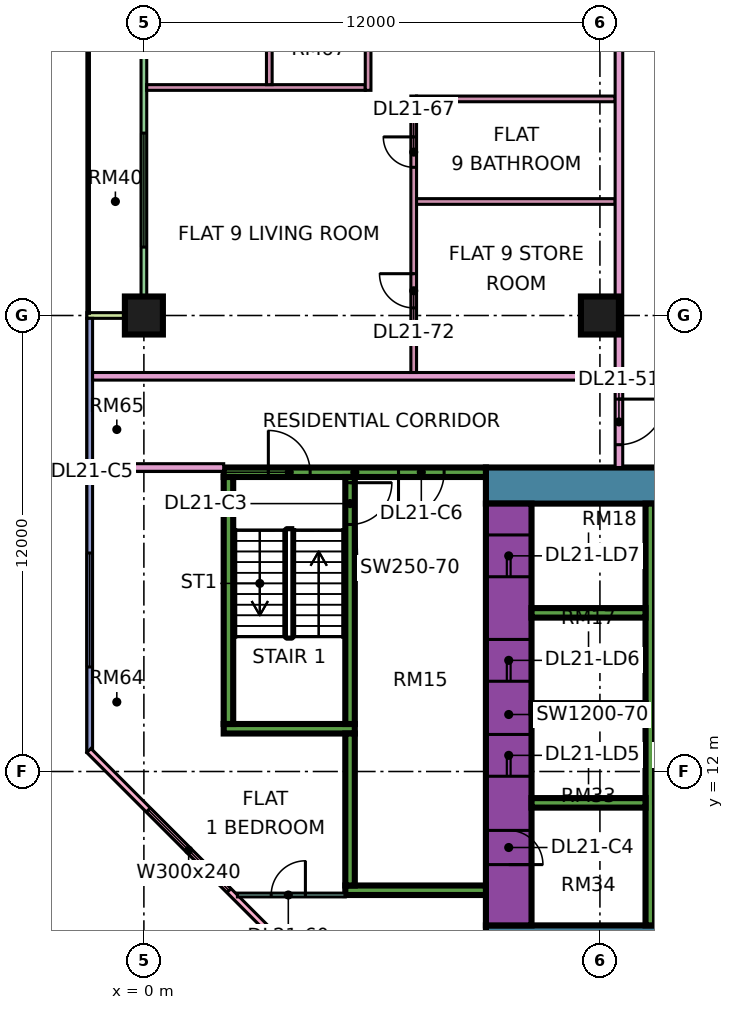
"""IFC4 building model, lengths in metres.
Left out: names, types, materials, properties, quantities, classifications, styles, units other than length and angle.
Written with IfcOpenShell. Run it as: python <this file> out.ifc"""

import sys

from ifc_helpers import new_model, si_unit, direction, frame, frame_2d, origin, origin_2d, place, context, subcontext, project, spatial, rectangle, extrude, element, fill, save


model = new_model("IFC4")
c1 = context("Model", 3, precision=1e-05, world=origin(), true_north=direction((0.0, 1.0)))
c2 = subcontext(c1, "Body", "Model", "MODEL_VIEW")
j1 = project(units=[si_unit("LENGTHUNIT", "METRE"), si_unit("PLANEANGLEUNIT", "RADIAN")], contexts=[c1])
p1 = place(None, origin())
s1 = spatial("IfcSite", under=j1, at=p1, CompositionType="ELEMENT")
p2 = place(p1, origin())
s2 = spatial("IfcBuilding", under=s1, at=p2, CompositionType="ELEMENT")
p3 = place(p2, frame((0.0, 0.0, 95.65)))
s3 = spatial("IfcBuildingStorey", under=s2, at=p3, CompositionType="ELEMENT", Elevation=95.65)
for number, where, z_axis, x_axis in (
    (1, (0.0, 24.0, 0.0), (0.0, 0.0, 1.0), (1.0, 0.0, 0.0)),
    (2, (12.0, 24.0, 0.0), (0.0, 0.0, 1.0), (1.0, 0.0, 0.0)),
):
    element("IfcColumn", number, at=place(p3, frame(where, z_axis=z_axis, x_axis=x_axis)), inside=s3, PredefinedType="COLUMN", context=c2, shape_type="SweptSolid", body=[
        extrude(rectangle(XDim=1.0, YDim=1.0, at=origin_2d()), origin(), (0.0, 0.0, 1.0), 3.75),
    ])
p4 = place(p3, frame((9.0, 7.475, 0.0), z_axis=(0.0, 0.0, 1.0), x_axis=(1.0, 0.0, 0.0)))
e3 = element("IfcWall", 3, at=p4, inside=s3, PredefinedType="SHEAR", context=c2, shape_type="SweptSolid", body=[
    extrude(rectangle(XDim=25.0, YDim=0.95, at=frame_2d((12.5, 0.0))), origin(), (0.0, 0.0, 1.0), 3.75),
])
p5 = place(p3, frame((9.0, 19.525, 0.0), z_axis=(0.0, 0.0, 1.0), x_axis=(1.0, 0.0, 0.0)))
e4 = element("IfcWall", 4, at=p5, inside=s3, PredefinedType="SHEAR", context=c2, shape_type="SweptSolid", body=[
    extrude(rectangle(XDim=25.0, YDim=0.95, at=frame_2d((12.5, 0.0))), origin(), (0.0, 0.0, 1.0), 3.75),
])
p6 = place(p5, frame((19.1, 0.0, 0.0)))
e5 = element("IfcOpeningElement", 5, at=p6, cuts=e4, PredefinedType="OPENING", context=c2, shape_type="SweptSolid", body=[
    extrude(rectangle(XDim=1.8, YDim=2.4, at=frame_2d((0.9, 1.2))), frame((0.0, 0.485, 0.0), z_axis=(0.0, -1.0, 0.0), x_axis=(1.0, 0.0, 0.0)), (0.0, 0.0, 1.0), 0.97),
])
p7 = place(p3, frame((9.6, 7.95, 0.0), z_axis=(0.0, 0.0, 1.0), x_axis=(0.0, 1.0, 0.0)))
e6 = element("IfcWall", 6, at=p7, inside=s3, PredefinedType="SHEAR", context=c2, shape_type="SweptSolid", body=[
    extrude(rectangle(XDim=11.1, YDim=1.2, at=frame_2d((5.55, 0.0))), origin(), (0.0, 0.0, 1.0), 3.75),
])
p8 = place(p7, frame((3.925, 0.0, 0.0)))
e7 = element("IfcOpeningElement", 7, at=p8, cuts=e6, PredefinedType="OPENING", context=c2, shape_type="SweptSolid", body=[
    extrude(rectangle(XDim=1.1, YDim=2.2, at=frame_2d((0.55, 1.1))), frame((0.0, 0.61, 0.0), z_axis=(0.0, -1.0, 0.0), x_axis=(1.0, 0.0, 0.0)), (0.0, 0.0, 1.0), 1.22),
])
p9 = place(p7, frame((6.425, 0.0, 0.0)))
e8 = element("IfcOpeningElement", 8, at=p9, cuts=e6, PredefinedType="OPENING", context=c2, shape_type="SweptSolid", body=[
    extrude(rectangle(XDim=1.1, YDim=2.2, at=frame_2d((0.55, 1.1))), frame((0.0, 0.61, 0.0), z_axis=(0.0, -1.0, 0.0), x_axis=(1.0, 0.0, 0.0)), (0.0, 0.0, 1.0), 1.22),
])
p10 = place(p7, frame((9.175, 0.0, 0.0)))
e9 = element("IfcOpeningElement", 9, at=p10, cuts=e6, PredefinedType="OPENING", context=c2, shape_type="SweptSolid", body=[
    extrude(rectangle(XDim=1.1, YDim=2.2, at=frame_2d((0.55, 1.1))), frame((0.0, 0.61, 0.0), z_axis=(0.0, -1.0, 0.0), x_axis=(1.0, 0.0, 0.0)), (0.0, 0.0, 1.0), 1.22),
])
p11 = place(p7, frame((1.6, 0.0, 0.0)))
e10 = element("IfcOpeningElement", 10, at=p11, cuts=e6, PredefinedType="OPENING", context=c2, shape_type="SweptSolid", body=[
    extrude(rectangle(XDim=0.9, YDim=2.1, at=frame_2d((0.45, 1.05))), frame((0.0, 0.61, 0.0), z_axis=(0.0, -1.0, 0.0), x_axis=(1.0, 0.0, 0.0)), (0.0, 0.0, 1.0), 1.22),
])
p12 = place(p3, frame((13.325, 7.95, 0.0), z_axis=(0.0, 0.0, 1.0), x_axis=(0.0, 1.0, 0.0)))
e11 = element("IfcWall", 11, at=p12, inside=s3, PredefinedType="SHEAR", context=c2, shape_type="SweptSolid", body=[
    extrude(rectangle(XDim=11.1, YDim=0.25, at=frame_2d((5.55, 0.0))), origin(), (0.0, 0.0, 1.0), 3.75),
])
for number, where, z_axis, x_axis in (
    (12, (10.2, 11.175, 0.0), (0.0, 0.0, 1.0), (1.0, 0.0, 0.0)),
    (13, (10.2, 13.675, 0.0), (0.0, 0.0, 1.0), (1.0, 0.0, 0.0)),
    (14, (10.2, 16.175, 0.0), (0.0, 0.0, 1.0), (1.0, 0.0, 0.0)),
):
    element("IfcWall", number, at=place(p3, frame(where, z_axis=z_axis, x_axis=x_axis)), inside=s3, PredefinedType="SHEAR", context=c2, shape_type="SweptSolid", body=[
        extrude(rectangle(XDim=3.0, YDim=0.25, at=frame_2d((1.5, 0.0))), origin(), (0.0, 0.0, 1.0), 3.75),
    ])
p13 = place(p3, frame((2.1, 19.875, 0.0), z_axis=(0.0, 0.0, 1.0), x_axis=(1.0, 0.0, 0.0)))
e15 = element("IfcWall", 15, at=p13, inside=s3, PredefinedType="SHEAR", context=c2, shape_type="SweptSolid", body=[
    extrude(rectangle(XDim=6.9, YDim=0.25, at=frame_2d((3.45, 0.0))), origin(), (0.0, 0.0, 1.0), 3.75),
])
p14 = place(p13, frame((1.175, 0.0, 0.0)))
e16 = element("IfcOpeningElement", 16, at=p14, cuts=e15, PredefinedType="OPENING", context=c2, shape_type="SweptSolid", body=[
    extrude(rectangle(XDim=1.1, YDim=2.2, at=frame_2d((0.55, 1.1))), frame((0.0, 0.135, 0.0), z_axis=(0.0, -1.0, 0.0), x_axis=(1.0, 0.0, 0.0)), (0.0, 0.0, 1.0), 0.27),
])
p15 = place(p13, frame((4.6, 0.0, 0.0)))
e17 = element("IfcOpeningElement", 17, at=p15, cuts=e15, PredefinedType="OPENING", context=c2, shape_type="SweptSolid", body=[
    extrude(rectangle(XDim=1.2, YDim=2.2, at=frame_2d((0.6, 1.1))), frame((0.0, 0.135, 0.0), z_axis=(0.0, -1.0, 0.0), x_axis=(1.0, 0.0, 0.0)), (0.0, 0.0, 1.0), 0.27),
])
p16 = place(p3, frame((2.1, 13.125, 0.0), z_axis=(0.0, 0.0, 1.0), x_axis=(1.0, 0.0, 0.0)))
e18 = element("IfcWall", 18, at=p16, inside=s3, PredefinedType="SHEAR", context=c2, shape_type="SweptSolid", body=[
    extrude(rectangle(XDim=3.45, YDim=0.25, at=frame_2d((1.725, 0.0))), origin(), (0.0, 0.0, 1.0), 3.75),
])
p17 = place(p3, frame((2.225, 13.25, 0.0), z_axis=(0.0, 0.0, 1.0), x_axis=(0.0, 1.0, 0.0)))
e19 = element("IfcWall", 19, at=p17, inside=s3, PredefinedType="SHEAR", context=c2, shape_type="SweptSolid", body=[
    extrude(rectangle(XDim=6.5, YDim=0.25, at=frame_2d((3.25, 0.0))), origin(), (0.0, 0.0, 1.0), 3.75),
])
p18 = place(p3, frame((5.425, 13.25, 0.0), z_axis=(0.0, 0.0, 1.0), x_axis=(0.0, 1.0, 0.0)))
e20 = element("IfcWall", 20, at=p18, inside=s3, PredefinedType="SHEAR", context=c2, shape_type="SweptSolid", body=[
    extrude(rectangle(XDim=6.5, YDim=0.25, at=frame_2d((3.25, 0.0))), origin(), (0.0, 0.0, 1.0), 3.75),
])
p19 = place(p18, frame((5.25, 0.0, 0.0)))
e21 = element("IfcOpeningElement", 21, at=p19, cuts=e20, PredefinedType="OPENING", context=c2, shape_type="SweptSolid", body=[
    extrude(rectangle(XDim=1.1, YDim=2.2, at=frame_2d((0.55, 1.1))), frame((0.0, 0.135, 0.0), z_axis=(0.0, -1.0, 0.0), x_axis=(1.0, 0.0, 0.0)), (0.0, 0.0, 1.0), 0.27),
])
p20 = place(p3, frame((5.3, 8.875, 0.0), z_axis=(0.0, 0.0, 1.0), x_axis=(1.0, 0.0, 0.0)))
e22 = element("IfcWall", 22, at=p20, inside=s3, PredefinedType="SHEAR", context=c2, shape_type="SweptSolid", body=[
    extrude(rectangle(XDim=3.7, YDim=0.25, at=frame_2d((1.85, 0.0))), origin(), (0.0, 0.0, 1.0), 3.75),
])
p21 = place(p3, frame((5.425, 9.0, 0.0), z_axis=(0.0, 0.0, 1.0), x_axis=(0.0, 1.0, 0.0)))
e23 = element("IfcWall", 23, at=p21, inside=s3, PredefinedType="SHEAR", context=c2, shape_type="SweptSolid", body=[
    extrude(rectangle(XDim=4.0, YDim=0.25, at=frame_2d((2.0, 0.0))), origin(), (0.0, 0.0, 1.0), 3.75),
])
p22 = place(p3, frame((0.0, 35.925, 0.0), z_axis=(0.0, 0.0, 1.0), x_axis=(0.0, -1.0, 0.0)))
e24 = element("IfcWall", 24, at=p22, inside=s3, PredefinedType="SOLIDWALL", context=c2, shape_type="SweptSolid", body=[
    extrude(rectangle(XDim=11.85, YDim=0.15, at=frame_2d((5.925, 0.0))), origin(), (0.0, 0.0, 1.0), 3.35),
])
p23 = place(p22, frame((2.325, 0.0, 0.0)))
e25 = element("IfcOpeningElement", 25, at=p23, cuts=e24, PredefinedType="OPENING", context=c2, shape_type="SweptSolid", body=[
    extrude(rectangle(XDim=1.8, YDim=2.4, at=frame_2d((0.9, 1.2))), frame((0.0, 0.085, 0.0), z_axis=(0.0, -1.0, 0.0), x_axis=(1.0, 0.0, 0.0)), (0.0, 0.0, 1.0), 0.17),
])
p24 = place(p22, frame((7.125, 0.0, 0.45)))
e26 = element("IfcOpeningElement", 26, at=p24, cuts=e24, PredefinedType="OPENING", context=c2, shape_type="SweptSolid", body=[
    extrude(rectangle(XDim=3.0, YDim=2.4, at=frame_2d((1.5, 1.2))), frame((0.0, 0.085, 0.0), z_axis=(0.0, -1.0, 0.0), x_axis=(1.0, 0.0, 0.0)), (0.0, 0.0, 1.0), 0.17),
])
p25 = place(p3, frame((-1.5, 24.0, 0.0), z_axis=(0.0, 0.0, 1.0), x_axis=(1.0, 0.0, 0.0)))
e27 = element("IfcWall", 27, at=p25, inside=s3, PredefinedType="SOLIDWALL", context=c2, shape_type="SweptSolid", body=[
    extrude(rectangle(XDim=1.5, YDim=0.15, at=frame_2d((0.75, 0.0))), origin(), (0.0, 0.0, 1.0), 3.35),
])
p26 = place(p3, frame((-1.425, 23.925, 0.0), z_axis=(0.0, 0.0, 1.0), x_axis=(0.0, -1.0, 0.0)))
e28 = element("IfcWall", 28, at=p26, inside=s3, PredefinedType="SOLIDWALL", context=c2, shape_type="SweptSolid", body=[
    extrude(rectangle(XDim=11.425, YDim=0.15, at=frame_2d((5.712, 0.0))), origin(), (0.0, 0.0, 1.0), 3.35),
])
p27 = place(p26, frame((6.175, 0.0, 0.45)))
e29 = element("IfcOpeningElement", 29, at=p27, cuts=e28, PredefinedType="OPENING", context=c2, shape_type="SweptSolid", body=[
    extrude(rectangle(XDim=3.0, YDim=2.4, at=frame_2d((1.5, 1.2))), frame((0.0, 0.085, 0.0), z_axis=(0.0, -1.0, 0.0), x_axis=(1.0, 0.0, 0.0)), (0.0, 0.0, 1.0), 0.17),
])
p28 = place(p3, frame((-1.447, 12.553, 0.0), z_axis=(0.0, 0.0, 1.0), x_axis=(0.707106781187, -0.707106781187, 0.0)))
e30 = element("IfcWall", 30, at=p28, inside=s3, PredefinedType="SOLIDWALL", context=c2, shape_type="SweptSolid", body=[
    extrude(rectangle(XDim=19.799, YDim=0.15, at=frame_2d((9.899, 0.0))), origin(), (0.0, 0.0, 1.0), 3.35),
])
p29 = place(p28, frame((2.212, 0.0, 0.45)))
e31 = element("IfcOpeningElement", 31, at=p29, cuts=e30, PredefinedType="OPENING", context=c2, shape_type="SweptSolid", body=[
    extrude(rectangle(XDim=3.0, YDim=2.4, at=frame_2d((1.5, 1.2))), frame((0.0, 0.085, 0.0), z_axis=(0.0, -1.0, 0.0), x_axis=(1.0, 0.0, 0.0)), (0.0, 0.0, 1.0), 0.17),
])
p30 = place(p28, frame((10.216, 0.0, 0.45)))
e32 = element("IfcOpeningElement", 32, at=p30, cuts=e30, PredefinedType="OPENING", context=c2, shape_type="SweptSolid", body=[
    extrude(rectangle(XDim=3.0, YDim=2.4, at=frame_2d((1.5, 1.2))), frame((0.0, 0.085, 0.0), z_axis=(0.0, -1.0, 0.0), x_axis=(1.0, 0.0, 0.0)), (0.0, 0.0, 1.0), 0.17),
])
p31 = place(p3, frame((-1.35, 20.0, 0.0), z_axis=(0.0, 0.0, 1.0), x_axis=(1.0, 0.0, 0.0)))
e33 = element("IfcWall", 33, at=p31, inside=s3, PredefinedType="PARTITIONING", context=c2, shape_type="SweptSolid", body=[
    extrude(rectangle(XDim=3.45, YDim=0.2, at=frame_2d((1.725, 0.0))), origin(), (0.0, 0.0, 1.0), 3.35),
])
p32 = place(p3, frame((-1.35, 22.4, 0.0), z_axis=(0.0, 0.0, 1.0), x_axis=(1.0, 0.0, 0.0)))
e34 = element("IfcWall", 34, at=p32, inside=s3, PredefinedType="PARTITIONING", context=c2, shape_type="SweptSolid", body=[
    extrude(rectangle(XDim=13.75, YDim=0.2, at=frame_2d((6.875, 0.0))), origin(), (0.0, 0.0, 1.0), 3.35),
])
p33 = place(p3, frame((0.074, 30.0, 0.0), z_axis=(0.0, 0.0, 1.0), x_axis=(1.0, 0.0, 0.0)))
e35 = element("IfcWall", 35, at=p33, inside=s3, PredefinedType="PARTITIONING", context=c2, shape_type="SweptSolid", body=[
    extrude(rectangle(XDim=5.751, YDim=0.15, at=frame_2d((2.875, 0.0))), origin(), (0.0, 0.0, 1.0), 3.35),
])
p34 = place(p3, frame((2.461, 8.75, 0.0), z_axis=(0.0, 0.0, 1.0), x_axis=(1.0, 0.0, 0.0)))
e36 = element("IfcWall", 36, at=p34, inside=s3, PredefinedType="PARTITIONING", context=c2, shape_type="SweptSolid", body=[
    extrude(rectangle(XDim=2.839, YDim=0.1, at=frame_2d((1.419, 0.0))), origin(), (0.0, 0.0, 1.0), 3.35),
])
p35 = place(p34, frame((0.889, 0.0, 0.0)))
e37 = element("IfcOpeningElement", 37, at=p35, cuts=e36, PredefinedType="OPENING", context=c2, shape_type="SweptSolid", body=[
    extrude(rectangle(XDim=0.9, YDim=2.1, at=frame_2d((0.45, 1.05))), frame((0.0, 0.06, 0.0), z_axis=(0.0, -1.0, 0.0), x_axis=(1.0, 0.0, 0.0)), (0.0, 0.0, 1.0), 0.12),
])
p36 = place(p3, frame((3.3, 30.075, 0.0), z_axis=(0.0, 0.0, 1.0), x_axis=(0.0, 1.0, 0.0)))
e38 = element("IfcWall", 38, at=p36, inside=s3, PredefinedType="PARTITIONING", context=c2, shape_type="SweptSolid", body=[
    extrude(rectangle(XDim=3.0, YDim=0.15, at=frame_2d((1.5, 0.0))), origin(), (0.0, 0.0, 1.0), 3.35),
])
p37 = place(p3, frame((5.9, 29.925, 0.0), z_axis=(0.0, 0.0, 1.0), x_axis=(0.0, 1.0, 0.0)))
e39 = element("IfcWall", 39, at=p37, inside=s3, PredefinedType="PARTITIONING", context=c2, shape_type="SweptSolid", body=[
    extrude(rectangle(XDim=5.975, YDim=0.15, at=frame_2d((2.987, 0.0))), origin(), (0.0, 0.0, 1.0), 3.35),
])
p38 = place(p37, frame((4.125, 0.0, 0.0)))
e40 = element("IfcOpeningElement", 40, at=p38, cuts=e39, PredefinedType="OPENING", context=c2, shape_type="SweptSolid", body=[
    extrude(rectangle(XDim=0.9, YDim=2.1, at=frame_2d((0.45, 1.05))), frame((0.0, 0.085, 0.0), z_axis=(0.0, -1.0, 0.0), x_axis=(1.0, 0.0, 0.0)), (0.0, 0.0, 1.0), 0.17),
])
p39 = place(p3, frame((7.1, 22.5, 0.0), z_axis=(0.0, 0.0, 1.0), x_axis=(0.0, 1.0, 0.0)))
e41 = element("IfcWall", 41, at=p39, inside=s3, PredefinedType="PARTITIONING", context=c2, shape_type="SweptSolid", body=[
    extrude(rectangle(XDim=7.275, YDim=0.15, at=frame_2d((3.637, 0.0))), origin(), (0.0, 0.0, 1.0), 3.35),
])
p40 = place(p39, frame((5.4, 0.0, 0.0)))
e42 = element("IfcOpeningElement", 42, at=p40, cuts=e41, PredefinedType="OPENING", context=c2, shape_type="SweptSolid", body=[
    extrude(rectangle(XDim=0.8, YDim=2.1, at=frame_2d((0.4, 1.05))), frame((0.0, 0.085, 0.0), z_axis=(0.0, -1.0, 0.0), x_axis=(1.0, 0.0, 0.0)), (0.0, 0.0, 1.0), 0.17),
])
p41 = place(p39, frame((1.7, 0.0, 0.0)))
e43 = element("IfcOpeningElement", 43, at=p41, cuts=e41, PredefinedType="OPENING", context=c2, shape_type="SweptSolid", body=[
    extrude(rectangle(XDim=0.9, YDim=2.1, at=frame_2d((0.45, 1.05))), frame((0.0, 0.085, 0.0), z_axis=(0.0, -1.0, 0.0), x_axis=(1.0, 0.0, 0.0)), (0.0, 0.0, 1.0), 0.17),
])
for number, where, z_axis, x_axis in (
    (44, (7.175, 27.0, 0.0), (0.0, 0.0, 1.0), (1.0, 0.0, 0.0)),
    (45, (7.175, 29.7, 0.0), (0.0, 0.0, 1.0), (1.0, 0.0, 0.0)),
):
    element("IfcWall", number, at=place(p3, frame(where, z_axis=z_axis, x_axis=x_axis)), inside=s3, PredefinedType="PARTITIONING", context=c2, shape_type="SweptSolid", body=[
        extrude(rectangle(XDim=5.225, YDim=0.15, at=frame_2d((2.612, 0.0))), origin(), (0.0, 0.0, 1.0), 3.35),
    ])
p42 = place(p3, frame((12.5, 20.0, 0.0), z_axis=(0.0, 0.0, 1.0), x_axis=(0.0, 1.0, 0.0)))
e46 = element("IfcWall", 46, at=p42, inside=s3, PredefinedType="PARTITIONING", context=c2, shape_type="SweptSolid", body=[
    extrude(rectangle(XDim=43.0, YDim=0.2, at=frame_2d((21.5, 0.0))), origin(), (0.0, 0.0, 1.0), 3.35),
])
p43 = place(p42, frame((28.65, 0.0, 0.0)))
e47 = element("IfcOpeningElement", 47, at=p43, cuts=e46, PredefinedType="OPENING", context=c2, shape_type="SweptSolid", body=[
    extrude(rectangle(XDim=1.0, YDim=2.1, at=frame_2d((0.5, 1.05))), frame((0.0, 0.11, 0.0), z_axis=(0.0, -1.0, 0.0), x_axis=(1.0, 0.0, 0.0)), (0.0, 0.0, 1.0), 0.22),
])
p44 = place(p42, frame((32.1, 0.0, 0.0)))
e48 = element("IfcOpeningElement", 48, at=p44, cuts=e46, PredefinedType="OPENING", context=c2, shape_type="SweptSolid", body=[
    extrude(rectangle(XDim=1.0, YDim=2.1, at=frame_2d((0.5, 1.05))), frame((0.0, 0.11, 0.0), z_axis=(0.0, -1.0, 0.0), x_axis=(1.0, 0.0, 0.0)), (0.0, 0.0, 1.0), 0.22),
])
p45 = place(p42, frame((0.6, 0.0, 0.0)))
e49 = element("IfcOpeningElement", 49, at=p45, cuts=e46, PredefinedType="OPENING", context=c2, shape_type="SweptSolid", body=[
    extrude(rectangle(XDim=1.2, YDim=2.1, at=frame_2d((0.6, 1.05))), frame((0.0, 0.11, 0.0), z_axis=(0.0, -1.0, 0.0), x_axis=(1.0, 0.0, 0.0)), (0.0, 0.0, 1.0), 0.22),
])
p46 = place(p42, frame((11.1, 0.0, 0.0)))
e50 = element("IfcOpeningElement", 50, at=p46, cuts=e46, PredefinedType="OPENING", context=c2, shape_type="SweptSolid", body=[
    extrude(rectangle(XDim=1.0, YDim=2.1, at=frame_2d((0.5, 1.05))), frame((0.0, 0.11, 0.0), z_axis=(0.0, -1.0, 0.0), x_axis=(1.0, 0.0, 0.0)), (0.0, 0.0, 1.0), 0.22),
])
p47 = place(p24, origin())
e51 = element("IfcWindow", 51, at=p47, inside=s3, PartitioningType="SINGLE_PANEL", PredefinedType="WINDOW", context=c2, shape_type="SweptSolid", body=[
    extrude(rectangle(XDim=3.0, YDim=2.4, at=frame_2d((1.5, 1.2))), frame((0.0, 0.03, 0.0), z_axis=(0.0, -1.0, 0.0), x_axis=(1.0, 0.0, 0.0)), (0.0, 0.0, 1.0), 0.06),
])
fill(e26, e51)
p48 = place(p27, origin())
e52 = element("IfcWindow", 52, at=p48, inside=s3, PartitioningType="SINGLE_PANEL", PredefinedType="WINDOW", context=c2, shape_type="SweptSolid", body=[
    extrude(rectangle(XDim=3.0, YDim=2.4, at=frame_2d((1.5, 1.2))), frame((0.0, 0.03, 0.0), z_axis=(0.0, -1.0, 0.0), x_axis=(1.0, 0.0, 0.0)), (0.0, 0.0, 1.0), 0.06),
])
fill(e29, e52)
p49 = place(p29, origin())
e53 = element("IfcWindow", 53, at=p49, inside=s3, PartitioningType="SINGLE_PANEL", PredefinedType="WINDOW", context=c2, shape_type="SweptSolid", body=[
    extrude(rectangle(XDim=3.0, YDim=2.4, at=frame_2d((1.5, 1.2))), frame((0.0, 0.03, 0.0), z_axis=(0.0, -1.0, 0.0), x_axis=(1.0, 0.0, 0.0)), (0.0, 0.0, 1.0), 0.06),
])
fill(e31, e53)
p50 = place(p8, origin())
e54 = element("IfcDoor", 54, at=p50, inside=s3, OperationType="DOUBLE_DOOR_SLIDING", PredefinedType="DOOR", context=c2, shape_type="SweptSolid", body=[
    extrude(rectangle(XDim=1.1, YDim=2.2, at=frame_2d((0.55, 1.1))), frame((0.0, 0.025, 0.0), z_axis=(0.0, -1.0, 0.0), x_axis=(1.0, 0.0, 0.0)), (0.0, 0.0, 1.0), 0.05),
])
fill(e7, e54)
p51 = place(p9, origin())
e55 = element("IfcDoor", 55, at=p51, inside=s3, OperationType="DOUBLE_DOOR_SLIDING", PredefinedType="DOOR", context=c2, shape_type="SweptSolid", body=[
    extrude(rectangle(XDim=1.1, YDim=2.2, at=frame_2d((0.55, 1.1))), frame((0.0, 0.025, 0.0), z_axis=(0.0, -1.0, 0.0), x_axis=(1.0, 0.0, 0.0)), (0.0, 0.0, 1.0), 0.05),
])
fill(e8, e55)
p52 = place(p10, origin())
e56 = element("IfcDoor", 56, at=p52, inside=s3, OperationType="DOUBLE_DOOR_SLIDING", PredefinedType="DOOR", context=c2, shape_type="SweptSolid", body=[
    extrude(rectangle(XDim=1.1, YDim=2.2, at=frame_2d((0.55, 1.1))), frame((0.0, 0.025, 0.0), z_axis=(0.0, -1.0, 0.0), x_axis=(1.0, 0.0, 0.0)), (0.0, 0.0, 1.0), 0.05),
])
fill(e9, e56)
p53 = place(p19, origin())
e57 = element("IfcDoor", 57, at=p53, inside=s3, OperationType="SINGLE_SWING_RIGHT", PredefinedType="DOOR", context=c2, shape_type="SweptSolid", body=[
    extrude(rectangle(XDim=1.1, YDim=2.2, at=frame_2d((0.55, 1.1))), frame((0.0, 0.025, 0.0), z_axis=(0.0, -1.0, 0.0), x_axis=(1.0, 0.0, 0.0)), (0.0, 0.0, 1.0), 0.05),
])
fill(e21, e57)
p54 = place(p11, frame((0.9, 0.0, 0.0), z_axis=(0.0, 0.0, 1.0), x_axis=(-1.0, 0.0, 0.0)))
e58 = element("IfcDoor", 58, at=p54, inside=s3, OperationType="SINGLE_SWING_LEFT", PredefinedType="DOOR", context=c2, shape_type="SweptSolid", body=[
    extrude(rectangle(XDim=0.9, YDim=2.1, at=frame_2d((0.45, 1.05))), frame((0.0, 0.025, 0.0), z_axis=(0.0, -1.0, 0.0), x_axis=(1.0, 0.0, 0.0)), (0.0, 0.0, 1.0), 0.05),
])
fill(e10, e58)
p55 = place(p14, origin())
e59 = element("IfcDoor", 59, at=p55, inside=s3, OperationType="SINGLE_SWING_LEFT", PredefinedType="DOOR", context=c2, shape_type="SweptSolid", body=[
    extrude(rectangle(XDim=1.1, YDim=2.2, at=frame_2d((0.55, 1.1))), frame((0.0, 0.025, 0.0), z_axis=(0.0, -1.0, 0.0), x_axis=(1.0, 0.0, 0.0)), (0.0, 0.0, 1.0), 0.05),
])
fill(e16, e59)
p56 = place(p15, frame((1.2, 0.0, 0.0), z_axis=(0.0, 0.0, 1.0), x_axis=(-1.0, 0.0, 0.0)))
e60 = element("IfcDoor", 60, at=p56, inside=s3, OperationType="SINGLE_SWING_LEFT", PredefinedType="DOOR", context=c2, shape_type="SweptSolid", body=[
    extrude(rectangle(XDim=1.2, YDim=2.2, at=frame_2d((0.6, 1.1))), frame((0.0, 0.025, 0.0), z_axis=(0.0, -1.0, 0.0), x_axis=(1.0, 0.0, 0.0)), (0.0, 0.0, 1.0), 0.05),
])
fill(e17, e60)
p57 = place(p45, origin())
e61 = element("IfcDoor", 61, at=p57, inside=s3, OperationType="SINGLE_SWING_RIGHT", PredefinedType="DOOR", context=c2, shape_type="SweptSolid", body=[
    extrude(rectangle(XDim=1.2, YDim=2.1, at=frame_2d((0.6, 1.05))), frame((0.0, 0.025, 0.0), z_axis=(0.0, -1.0, 0.0), x_axis=(1.0, 0.0, 0.0)), (0.0, 0.0, 1.0), 0.05),
])
fill(e49, e61)
p58 = place(p35, frame((0.9, 0.0, 0.0), z_axis=(0.0, 0.0, 1.0), x_axis=(-1.0, 0.0, 0.0)))
e62 = element("IfcDoor", 62, at=p58, inside=s3, OperationType="SINGLE_SWING_RIGHT", PredefinedType="DOOR", context=c2, shape_type="SweptSolid", body=[
    extrude(rectangle(XDim=0.9, YDim=2.1, at=frame_2d((0.45, 1.05))), frame((0.0, 0.025, 0.0), z_axis=(0.0, -1.0, 0.0), x_axis=(1.0, 0.0, 0.0)), (0.0, 0.0, 1.0), 0.05),
])
fill(e37, e62)
p59 = place(p40, frame((0.8, 0.0, 0.0), z_axis=(0.0, 0.0, 1.0), x_axis=(-1.0, 0.0, 0.0)))
e63 = element("IfcDoor", 63, at=p59, inside=s3, OperationType="SINGLE_SWING_RIGHT", PredefinedType="DOOR", context=c2, shape_type="SweptSolid", body=[
    extrude(rectangle(XDim=0.8, YDim=2.1, at=frame_2d((0.4, 1.05))), frame((0.0, 0.025, 0.0), z_axis=(0.0, -1.0, 0.0), x_axis=(1.0, 0.0, 0.0)), (0.0, 0.0, 1.0), 0.05),
])
fill(e42, e63)
p60 = place(p41, frame((0.9, 0.0, 0.0), z_axis=(0.0, 0.0, 1.0), x_axis=(-1.0, 0.0, 0.0)))
e64 = element("IfcDoor", 64, at=p60, inside=s3, OperationType="SINGLE_SWING_RIGHT", PredefinedType="DOOR", context=c2, shape_type="SweptSolid", body=[
    extrude(rectangle(XDim=0.9, YDim=2.1, at=frame_2d((0.45, 1.05))), frame((0.0, 0.025, 0.0), z_axis=(0.0, -1.0, 0.0), x_axis=(1.0, 0.0, 0.0)), (0.0, 0.0, 1.0), 0.05),
])
fill(e43, e64)
save(model, sys.argv[1])
